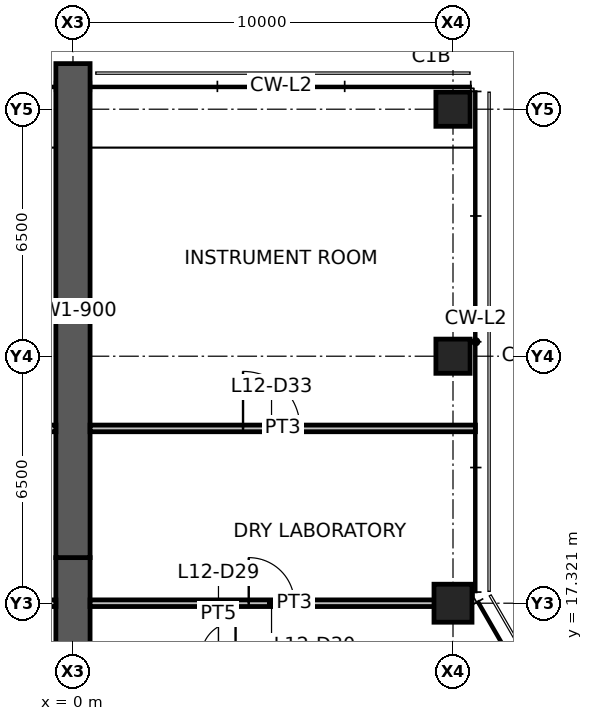
"""IFC4 building model, lengths in metres.
Left out: names, types, materials, properties, quantities, classifications, styles, units other than length and angle.
Written with IfcOpenShell. Run it as: python <this file> out.ifc"""

import sys

from ifc_helpers import new_model, si_unit, direction, frame, frame_2d, origin, origin_2d, place, context, subcontext, project, spatial, rectangle, hollow_rectangle, extrude, element, fill, save


model = new_model("IFC4")
c1 = context("Model", 3, precision=1e-05, world=origin(), true_north=direction((0.0, 1.0)))
c2 = subcontext(c1, "Body", "Model", "MODEL_VIEW")
j1 = project(units=[si_unit("LENGTHUNIT", "METRE"), si_unit("PLANEANGLEUNIT", "RADIAN")], contexts=[c1])
p1 = place(None, origin())
s1 = spatial("IfcSite", under=j1, at=p1, CompositionType="ELEMENT")
p2 = place(p1, origin())
s2 = spatial("IfcBuilding", under=s1, at=p2, CompositionType="ELEMENT")
p3 = place(p2, frame((0.0, 0.0, 47.8)))
s3 = spatial("IfcBuildingStorey", under=s2, at=p3, CompositionType="ELEMENT", Elevation=47.8)
p4 = place(p3, frame((10.0, 17.321, 0.0), z_axis=(0.0, 0.0, 1.0), x_axis=(1.0, 0.0, 0.0)))
e1 = element("IfcColumn", 1, at=p4, inside=s3, PredefinedType="COLUMN", context=c2, shape_type="SweptSolid", body=[
    extrude(hollow_rectangle(XDim=1.0, YDim=1.0, WallThickness=0.06, at=origin_2d()), origin(), (0.0, 0.0, 1.0), 4.2),
])
for number, where, z_axis, x_axis in (
    (2, (10.0, 23.821, 0.0), (0.0, 0.0, 1.0), (1.0, 0.0, 0.0)),
    (3, (10.0, 30.321, 0.0), (0.0, 0.0, 1.0), (1.0, 0.0, 0.0)),
):
    element("IfcColumn", number, at=place(p3, frame(where, z_axis=z_axis, x_axis=x_axis)), inside=s3, PredefinedType="COLUMN", context=c2, shape_type="SweptSolid", body=[
        extrude(hollow_rectangle(XDim=0.9, YDim=0.9, WallThickness=0.05, at=origin_2d()), origin(), (0.0, 0.0, 1.0), 4.2),
    ])
p5 = place(p3, frame((0.0, 10.925, 0.0), z_axis=(0.0, 0.0, 1.0), x_axis=(0.0, 1.0, 0.0)))
e4 = element("IfcWall", 4, at=p5, inside=s3, PredefinedType="SHEAR", context=c2, shape_type="SweptSolid", body=[
    extrude(rectangle(XDim=7.595, YDim=0.9, at=frame_2d((3.798, 0.0))), origin(), (0.0, 0.0, 1.0), 4.2),
])
p6 = place(p5, frame((0.8, 0.0, 0.0)))
e5 = element("IfcOpeningElement", 5, at=p6, cuts=e4, PredefinedType="OPENING", context=c2, shape_type="SweptSolid", body=[
    extrude(rectangle(XDim=1.0, YDim=2.1, at=frame_2d((0.5, 1.05))), frame((0.0, 0.46, 0.0), z_axis=(0.0, -1.0, 0.0), x_axis=(1.0, 0.0, 0.0)), (0.0, 0.0, 1.0), 0.92),
])
p7 = place(p3, frame((0.0, 18.521, 0.0), z_axis=(0.0, 0.0, 1.0), x_axis=(0.0, 1.0, 0.0)))
e6 = element("IfcWall", 6, at=p7, inside=s3, PredefinedType="SHEAR", context=c2, shape_type="SweptSolid", body=[
    extrude(rectangle(XDim=13.0, YDim=0.9, at=frame_2d((6.5, 0.0))), origin(), (0.0, 0.0, 1.0), 4.2),
])
p8 = place(p3, frame((0.45, 17.321, 0.0), z_axis=(0.0, 0.0, 1.0), x_axis=(1.0, 0.0, 0.0)))
e7 = element("IfcWall", 7, at=p8, inside=s3, PredefinedType="PARTITIONING", context=c2, shape_type="SweptSolid", body=[
    extrude(rectangle(XDim=9.55, YDim=0.175, at=frame_2d((4.775, 0.0))), origin(), (0.0, 0.0, 1.0), 2.95),
])
p9 = place(p8, frame((4.175, 0.0, 0.0)))
e8 = element("IfcOpeningElement", 8, at=p9, cuts=e7, PredefinedType="OPENING", context=c2, shape_type="SweptSolid", body=[
    extrude(rectangle(XDim=1.2, YDim=2.1, at=frame_2d((0.6, 1.05))), frame((0.0, 0.098, 0.0), z_axis=(0.0, -1.0, 0.0), x_axis=(1.0, 0.0, 0.0)), (0.0, 0.0, 1.0), 0.195),
])
p10 = place(p3, frame((0.45, 21.92, 0.0), z_axis=(0.0, 0.0, 1.0), x_axis=(1.0, 0.0, 0.0)))
e9 = element("IfcWall", 9, at=p10, inside=s3, PredefinedType="PARTITIONING", context=c2, shape_type="SweptSolid", body=[
    extrude(rectangle(XDim=10.14, YDim=0.175, at=frame_2d((5.07, 0.0))), origin(), (0.0, 0.0, 1.0), 3.95),
])
p11 = place(p10, frame((4.025, 0.0, 0.0)))
e10 = element("IfcOpeningElement", 10, at=p11, cuts=e9, PredefinedType="OPENING", context=c2, shape_type="SweptSolid", body=[
    extrude(rectangle(XDim=1.5, YDim=2.1, at=frame_2d((0.75, 1.05))), frame((0.0, 0.098, 0.0), z_axis=(0.0, -1.0, 0.0), x_axis=(1.0, 0.0, 0.0)), (0.0, 0.0, 1.0), 0.195),
])
p12 = place(p3, frame((-0.45, 17.321, 0.0), z_axis=(0.0, 0.0, 1.0), x_axis=(-1.0, 0.0, 0.0)))
e11 = element("IfcWall", 11, at=p12, inside=s3, PredefinedType="PARTITIONING", context=c2, shape_type="SweptSolid", body=[
    extrude(rectangle(XDim=9.55, YDim=0.175, at=frame_2d((4.775, 0.0))), origin(), (0.0, 0.0, 1.0), 2.95),
])
p13 = place(p12, frame((4.175, 0.0, 0.0)))
e12 = element("IfcOpeningElement", 12, at=p13, cuts=e11, PredefinedType="OPENING", context=c2, shape_type="SweptSolid", body=[
    extrude(rectangle(XDim=1.2, YDim=2.1, at=frame_2d((0.6, 1.05))), frame((0.0, 0.098, 0.0), z_axis=(0.0, -1.0, 0.0), x_axis=(1.0, 0.0, 0.0)), (0.0, 0.0, 1.0), 0.195),
])
p14 = place(p3, frame((-0.45, 21.92, 0.0), z_axis=(0.0, 0.0, 1.0), x_axis=(-1.0, 0.0, 0.0)))
e13 = element("IfcWall", 13, at=p14, inside=s3, PredefinedType="PARTITIONING", context=c2, shape_type="SweptSolid", body=[
    extrude(rectangle(XDim=10.14, YDim=0.175, at=frame_2d((5.07, 0.0))), origin(), (0.0, 0.0, 1.0), 3.95),
])
p15 = place(p14, frame((4.025, 0.0, 0.0)))
e14 = element("IfcOpeningElement", 14, at=p15, cuts=e13, PredefinedType="OPENING", context=c2, shape_type="SweptSolid", body=[
    extrude(rectangle(XDim=1.5, YDim=2.1, at=frame_2d((0.75, 1.05))), frame((0.0, 0.098, 0.0), z_axis=(0.0, -1.0, 0.0), x_axis=(1.0, 0.0, 0.0)), (0.0, 0.0, 1.0), 0.195),
])
p16 = place(p9, origin())
e15 = element("IfcDoor", 15, at=p16, inside=s3, OperationType="DOUBLE_DOOR_SINGLE_SWING", PredefinedType="DOOR", context=c2, shape_type="SweptSolid", body=[
    extrude(rectangle(XDim=1.2, YDim=2.1, at=frame_2d((0.6, 1.05))), frame((0.0, 0.025, 0.0), z_axis=(0.0, -1.0, 0.0), x_axis=(1.0, 0.0, 0.0)), (0.0, 0.0, 1.0), 0.05),
])
fill(e8, e15)
p17 = place(p11, origin())
e16 = element("IfcDoor", 16, at=p17, inside=s3, OperationType="DOUBLE_DOOR_SINGLE_SWING", PredefinedType="DOOR", context=c2, shape_type="SweptSolid", body=[
    extrude(rectangle(XDim=1.5, YDim=2.1, at=frame_2d((0.75, 1.05))), frame((0.0, 0.025, 0.0), z_axis=(0.0, -1.0, 0.0), x_axis=(1.0, 0.0, 0.0)), (0.0, 0.0, 1.0), 0.05),
])
fill(e10, e16)
save(model, sys.argv[1])
